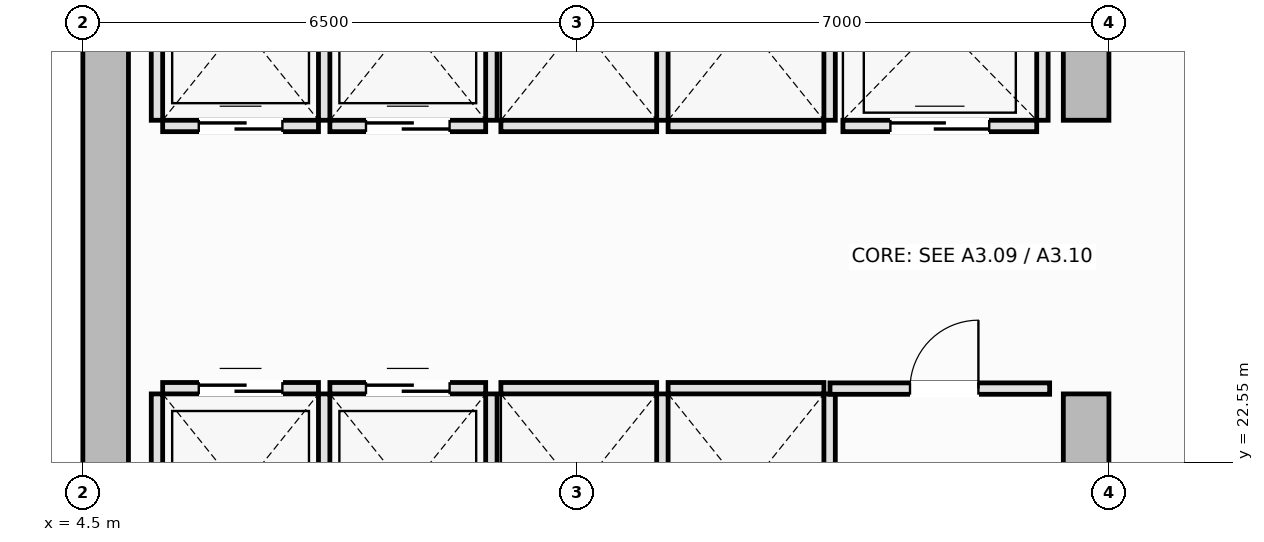
"""IFC4 building model, lengths in metres.
Left out: names, types, materials, properties, quantities, classifications, styles, units other than length and angle.
Written with IfcOpenShell. Run it as: python <this file> out.ifc"""

import sys

from ifc_helpers import new_model, si_unit, direction, frame, frame_2d, origin, place, context, subcontext, project, spatial, rectangle, extrude, element, fill, save


model = new_model("IFC4")
c1 = context("Model", 3, precision=1e-05, world=origin(), true_north=direction((0.0, 1.0)))
c2 = subcontext(c1, "Body", "Model", "MODEL_VIEW")
j1 = project(units=[si_unit("LENGTHUNIT", "METRE"), si_unit("PLANEANGLEUNIT", "RADIAN")], contexts=[c1])
p1 = place(None, origin())
s1 = spatial("IfcSite", under=j1, at=p1, CompositionType="ELEMENT")
p2 = place(p1, origin())
s2 = spatial("IfcBuilding", under=s1, at=p2, CompositionType="ELEMENT")
p3 = place(p2, frame((0.0, 0.0, 105.8)))
s3 = spatial("IfcBuildingStorey", under=s2, at=p3, CompositionType="ELEMENT", Elevation=105.8)
p4 = place(p3, frame((4.8, 14.6, 0.0), z_axis=(0.0, 0.0, 1.0), x_axis=(0.0, 1.0, 0.0)))
e1 = element("IfcWall", 1, at=p4, inside=s3, PredefinedType="SHEAR", context=c2, shape_type="SweptSolid", body=[
    extrude(rectangle(XDim=21.3, YDim=0.6, at=frame_2d((10.65, 0.0))), origin(), (0.0, 0.0, 1.0), 3.55),
])
p5 = place(p3, frame((17.7, 14.6, 0.0), z_axis=(0.0, 0.0, 1.0), x_axis=(0.0, 1.0, 0.0)))
e2 = element("IfcWall", 2, at=p5, inside=s3, PredefinedType="SHEAR", context=c2, shape_type="SweptSolid", body=[
    extrude(rectangle(XDim=8.85, YDim=0.6, at=frame_2d((4.425, 0.0))), origin(), (0.0, 0.0, 1.0), 3.55),
])
p6 = place(p5, frame((4.3, 0.0, 0.0)))
e3 = element("IfcOpeningElement", 3, at=p6, cuts=e2, PredefinedType="OPENING", context=c2, shape_type="SweptSolid", body=[
    extrude(rectangle(XDim=1.1, YDim=2.15, at=frame_2d((0.55, 1.075))), frame((0.0, 0.31, 0.0), z_axis=(0.0, -1.0, 0.0), x_axis=(1.0, 0.0, 0.0)), (0.0, 0.0, 1.0), 0.62),
])
p7 = place(p3, frame((17.7, 27.05, 0.0), z_axis=(0.0, 0.0, 1.0), x_axis=(0.0, 1.0, 0.0)))
e4 = element("IfcWall", 4, at=p7, inside=s3, PredefinedType="SHEAR", context=c2, shape_type="SweptSolid", body=[
    extrude(rectangle(XDim=8.85, YDim=0.6, at=frame_2d((4.425, 0.0))), origin(), (0.0, 0.0, 1.0), 3.55),
])
p8 = place(p7, frame((3.45, 0.0, 0.0)))
e5 = element("IfcOpeningElement", 5, at=p8, cuts=e4, PredefinedType="OPENING", context=c2, shape_type="SweptSolid", body=[
    extrude(rectangle(XDim=1.1, YDim=2.15, at=frame_2d((0.55, 1.075))), frame((0.0, 0.31, 0.0), z_axis=(0.0, -1.0, 0.0), x_axis=(1.0, 0.0, 0.0)), (0.0, 0.0, 1.0), 0.62),
])
p9 = place(p3, frame((5.55, 23.525, 0.0), z_axis=(0.0, 0.0, 1.0), x_axis=(1.0, 0.0, 0.0)))
e6 = element("IfcWall", 6, at=p9, inside=s3, PredefinedType="PARTITIONING", context=c2, shape_type="SweptSolid", body=[
    extrude(rectangle(XDim=2.05, YDim=0.15, at=frame_2d((1.025, 0.0))), origin(), (0.0, 0.0, 1.0), 3.37),
])
p10 = place(p9, frame((0.475, 0.0, 0.0)))
e7 = element("IfcOpeningElement", 7, at=p10, cuts=e6, PredefinedType="OPENING", context=c2, shape_type="SweptSolid", body=[
    extrude(rectangle(XDim=1.1, YDim=2.2, at=frame_2d((0.55, 1.1))), frame((0.0, 0.085, 0.0), z_axis=(0.0, -1.0, 0.0), x_axis=(1.0, 0.0, 0.0)), (0.0, 0.0, 1.0), 0.17),
])
for number, where, z_axis, x_axis in (
    (8, (5.475, 20.9, 0.0), (0.0, 0.0, 1.0), (0.0, 1.0, 0.0)),
    (9, (7.675, 20.9, 0.0), (0.0, 0.0, 1.0), (0.0, 1.0, 0.0)),
):
    element("IfcWall", number, at=place(p3, frame(where, z_axis=z_axis, x_axis=x_axis)), inside=s3, PredefinedType="PARTITIONING", context=c2, shape_type="SweptSolid", body=[
        extrude(rectangle(XDim=2.55, YDim=0.15, at=frame_2d((1.275, 0.0))), origin(), (0.0, 0.0, 1.0), 3.37),
    ])
p11 = place(p3, frame((7.75, 23.525, 0.0), z_axis=(0.0, 0.0, 1.0), x_axis=(1.0, 0.0, 0.0)))
e10 = element("IfcWall", 10, at=p11, inside=s3, PredefinedType="PARTITIONING", context=c2, shape_type="SweptSolid", body=[
    extrude(rectangle(XDim=2.05, YDim=0.15, at=frame_2d((1.025, 0.0))), origin(), (0.0, 0.0, 1.0), 3.37),
])
p12 = place(p11, frame((0.475, 0.0, 0.0)))
e11 = element("IfcOpeningElement", 11, at=p12, cuts=e10, PredefinedType="OPENING", context=c2, shape_type="SweptSolid", body=[
    extrude(rectangle(XDim=1.1, YDim=2.2, at=frame_2d((0.55, 1.1))), frame((0.0, 0.085, 0.0), z_axis=(0.0, -1.0, 0.0), x_axis=(1.0, 0.0, 0.0)), (0.0, 0.0, 1.0), 0.17),
])
p13 = place(p3, frame((9.875, 20.9, 0.0), z_axis=(0.0, 0.0, 1.0), x_axis=(0.0, 1.0, 0.0)))
e12 = element("IfcWall", 12, at=p13, inside=s3, PredefinedType="PARTITIONING", context=c2, shape_type="SweptSolid", body=[
    extrude(rectangle(XDim=2.55, YDim=0.15, at=frame_2d((1.275, 0.0))), origin(), (0.0, 0.0, 1.0), 3.37),
])
p14 = place(p3, frame((5.55, 26.975, 0.0), z_axis=(0.0, 0.0, 1.0), x_axis=(1.0, 0.0, 0.0)))
e13 = element("IfcWall", 13, at=p14, inside=s3, PredefinedType="PARTITIONING", context=c2, shape_type="SweptSolid", body=[
    extrude(rectangle(XDim=2.05, YDim=0.15, at=frame_2d((1.025, 0.0))), origin(), (0.0, 0.0, 1.0), 3.37),
])
p15 = place(p14, frame((0.475, 0.0, 0.0)))
e14 = element("IfcOpeningElement", 14, at=p15, cuts=e13, PredefinedType="OPENING", context=c2, shape_type="SweptSolid", body=[
    extrude(rectangle(XDim=1.1, YDim=2.2, at=frame_2d((0.55, 1.1))), frame((0.0, 0.085, 0.0), z_axis=(0.0, -1.0, 0.0), x_axis=(1.0, 0.0, 0.0)), (0.0, 0.0, 1.0), 0.17),
])
for number, where, z_axis, x_axis in (
    (15, (5.475, 27.05, 0.0), (0.0, 0.0, 1.0), (0.0, 1.0, 0.0)),
    (16, (7.675, 27.05, 0.0), (0.0, 0.0, 1.0), (0.0, 1.0, 0.0)),
):
    element("IfcWall", number, at=place(p3, frame(where, z_axis=z_axis, x_axis=x_axis)), inside=s3, PredefinedType="PARTITIONING", context=c2, shape_type="SweptSolid", body=[
        extrude(rectangle(XDim=2.55, YDim=0.15, at=frame_2d((1.275, 0.0))), origin(), (0.0, 0.0, 1.0), 3.37),
    ])
p16 = place(p3, frame((7.75, 26.975, 0.0), z_axis=(0.0, 0.0, 1.0), x_axis=(1.0, 0.0, 0.0)))
e17 = element("IfcWall", 17, at=p16, inside=s3, PredefinedType="PARTITIONING", context=c2, shape_type="SweptSolid", body=[
    extrude(rectangle(XDim=2.05, YDim=0.15, at=frame_2d((1.025, 0.0))), origin(), (0.0, 0.0, 1.0), 3.37),
])
p17 = place(p16, frame((0.475, 0.0, 0.0)))
e18 = element("IfcOpeningElement", 18, at=p17, cuts=e17, PredefinedType="OPENING", context=c2, shape_type="SweptSolid", body=[
    extrude(rectangle(XDim=1.1, YDim=2.2, at=frame_2d((0.55, 1.1))), frame((0.0, 0.085, 0.0), z_axis=(0.0, -1.0, 0.0), x_axis=(1.0, 0.0, 0.0)), (0.0, 0.0, 1.0), 0.17),
])
p18 = place(p3, frame((9.875, 27.05, 0.0), z_axis=(0.0, 0.0, 1.0), x_axis=(0.0, 1.0, 0.0)))
e19 = element("IfcWall", 19, at=p18, inside=s3, PredefinedType="PARTITIONING", context=c2, shape_type="SweptSolid", body=[
    extrude(rectangle(XDim=2.55, YDim=0.15, at=frame_2d((1.275, 0.0))), origin(), (0.0, 0.0, 1.0), 3.37),
])
p19 = place(p3, frame((10.0, 23.525, 0.0), z_axis=(0.0, 0.0, 1.0), x_axis=(1.0, 0.0, 0.0)))
e20 = element("IfcWall", 20, at=p19, inside=s3, PredefinedType="PARTITIONING", context=c2, shape_type="SweptSolid", body=[
    extrude(rectangle(XDim=2.05, YDim=0.15, at=frame_2d((1.025, 0.0))), origin(), (0.0, 0.0, 1.0), 3.37),
])
p20 = place(p3, frame((12.125, 20.9, 0.0), z_axis=(0.0, 0.0, 1.0), x_axis=(0.0, 1.0, 0.0)))
e21 = element("IfcWall", 21, at=p20, inside=s3, PredefinedType="PARTITIONING", context=c2, shape_type="SweptSolid", body=[
    extrude(rectangle(XDim=2.55, YDim=0.15, at=frame_2d((1.275, 0.0))), origin(), (0.0, 0.0, 1.0), 3.37),
])
p21 = place(p3, frame((12.2, 23.525, 0.0), z_axis=(0.0, 0.0, 1.0), x_axis=(1.0, 0.0, 0.0)))
e22 = element("IfcWall", 22, at=p21, inside=s3, PredefinedType="PARTITIONING", context=c2, shape_type="SweptSolid", body=[
    extrude(rectangle(XDim=2.05, YDim=0.15, at=frame_2d((1.025, 0.0))), origin(), (0.0, 0.0, 1.0), 3.37),
])
p22 = place(p3, frame((14.325, 20.9, 0.0), z_axis=(0.0, 0.0, 1.0), x_axis=(0.0, 1.0, 0.0)))
e23 = element("IfcWall", 23, at=p22, inside=s3, PredefinedType="PARTITIONING", context=c2, shape_type="SweptSolid", body=[
    extrude(rectangle(XDim=2.55, YDim=0.15, at=frame_2d((1.275, 0.0))), origin(), (0.0, 0.0, 1.0), 3.37),
])
p23 = place(p3, frame((10.0, 26.975, 0.0), z_axis=(0.0, 0.0, 1.0), x_axis=(1.0, 0.0, 0.0)))
e24 = element("IfcWall", 24, at=p23, inside=s3, PredefinedType="PARTITIONING", context=c2, shape_type="SweptSolid", body=[
    extrude(rectangle(XDim=2.05, YDim=0.15, at=frame_2d((1.025, 0.0))), origin(), (0.0, 0.0, 1.0), 3.37),
])
p24 = place(p3, frame((12.125, 27.05, 0.0), z_axis=(0.0, 0.0, 1.0), x_axis=(0.0, 1.0, 0.0)))
e25 = element("IfcWall", 25, at=p24, inside=s3, PredefinedType="PARTITIONING", context=c2, shape_type="SweptSolid", body=[
    extrude(rectangle(XDim=2.55, YDim=0.15, at=frame_2d((1.275, 0.0))), origin(), (0.0, 0.0, 1.0), 3.37),
])
p25 = place(p3, frame((12.2, 26.975, 0.0), z_axis=(0.0, 0.0, 1.0), x_axis=(1.0, 0.0, 0.0)))
e26 = element("IfcWall", 26, at=p25, inside=s3, PredefinedType="PARTITIONING", context=c2, shape_type="SweptSolid", body=[
    extrude(rectangle(XDim=2.05, YDim=0.15, at=frame_2d((1.025, 0.0))), origin(), (0.0, 0.0, 1.0), 3.37),
])
p26 = place(p3, frame((14.325, 27.05, 0.0), z_axis=(0.0, 0.0, 1.0), x_axis=(0.0, 1.0, 0.0)))
e27 = element("IfcWall", 27, at=p26, inside=s3, PredefinedType="PARTITIONING", context=c2, shape_type="SweptSolid", body=[
    extrude(rectangle(XDim=2.55, YDim=0.15, at=frame_2d((1.275, 0.0))), origin(), (0.0, 0.0, 1.0), 3.37),
])
p27 = place(p3, frame((14.5, 26.975, 0.0), z_axis=(0.0, 0.0, 1.0), x_axis=(1.0, 0.0, 0.0)))
e28 = element("IfcWall", 28, at=p27, inside=s3, PredefinedType="PARTITIONING", context=c2, shape_type="SweptSolid", body=[
    extrude(rectangle(XDim=2.55, YDim=0.15, at=frame_2d((1.275, 0.0))), origin(), (0.0, 0.0, 1.0), 3.37),
])
p28 = place(p27, frame((0.625, 0.0, 0.0)))
e29 = element("IfcOpeningElement", 29, at=p28, cuts=e28, PredefinedType="OPENING", context=c2, shape_type="SweptSolid", body=[
    extrude(rectangle(XDim=1.3, YDim=2.2, at=frame_2d((0.65, 1.1))), frame((0.0, 0.085, 0.0), z_axis=(0.0, -1.0, 0.0), x_axis=(1.0, 0.0, 0.0)), (0.0, 0.0, 1.0), 0.17),
])
p29 = place(p3, frame((17.125, 27.05, 0.0), z_axis=(0.0, 0.0, 1.0), x_axis=(0.0, 1.0, 0.0)))
e30 = element("IfcWall", 30, at=p29, inside=s3, PredefinedType="PARTITIONING", context=c2, shape_type="SweptSolid", body=[
    extrude(rectangle(XDim=2.6, YDim=0.15, at=frame_2d((1.3, 0.0))), origin(), (0.0, 0.0, 1.0), 3.37),
])
p30 = place(p3, frame((14.33, 23.52, 0.0), z_axis=(0.0, 0.0, 1.0), x_axis=(1.0, 0.0, 0.0)))
e31 = element("IfcWall", 31, at=p30, inside=s3, PredefinedType="PARTITIONING", context=c2, shape_type="SweptSolid", body=[
    extrude(rectangle(XDim=2.89, YDim=0.15, at=frame_2d((1.445, 0.0))), origin(), (0.0, 0.0, 1.0), 3.37),
])
p31 = place(p30, frame((1.053, 0.0, 0.0)))
e32 = element("IfcOpeningElement", 32, at=p31, cuts=e31, PredefinedType="OPENING", context=c2, shape_type="SweptSolid", body=[
    extrude(rectangle(XDim=0.9, YDim=2.1, at=frame_2d((0.45, 1.05))), frame((0.0, 0.085, 0.0), z_axis=(0.0, -1.0, 0.0), x_axis=(1.0, 0.0, 0.0)), (0.0, 0.0, 1.0), 0.17),
])
p32 = place(p10, origin())
e33 = element("IfcDoor", 33, at=p32, inside=s3, OperationType="DOUBLE_DOOR_SLIDING", PredefinedType="DOOR", context=c2, shape_type="SweptSolid", body=[
    extrude(rectangle(XDim=1.1, YDim=2.2, at=frame_2d((0.55, 1.1))), frame((0.0, 0.025, 0.0), z_axis=(0.0, -1.0, 0.0), x_axis=(1.0, 0.0, 0.0)), (0.0, 0.0, 1.0), 0.05),
])
fill(e7, e33)
p33 = place(p12, origin())
e34 = element("IfcDoor", 34, at=p33, inside=s3, OperationType="DOUBLE_DOOR_SLIDING", PredefinedType="DOOR", context=c2, shape_type="SweptSolid", body=[
    extrude(rectangle(XDim=1.1, YDim=2.2, at=frame_2d((0.55, 1.1))), frame((0.0, 0.025, 0.0), z_axis=(0.0, -1.0, 0.0), x_axis=(1.0, 0.0, 0.0)), (0.0, 0.0, 1.0), 0.05),
])
fill(e11, e34)
p34 = place(p15, origin())
e35 = element("IfcDoor", 35, at=p34, inside=s3, OperationType="DOUBLE_DOOR_SLIDING", PredefinedType="DOOR", context=c2, shape_type="SweptSolid", body=[
    extrude(rectangle(XDim=1.1, YDim=2.2, at=frame_2d((0.55, 1.1))), frame((0.0, 0.025, 0.0), z_axis=(0.0, -1.0, 0.0), x_axis=(1.0, 0.0, 0.0)), (0.0, 0.0, 1.0), 0.05),
])
fill(e14, e35)
p35 = place(p17, origin())
e36 = element("IfcDoor", 36, at=p35, inside=s3, OperationType="DOUBLE_DOOR_SLIDING", PredefinedType="DOOR", context=c2, shape_type="SweptSolid", body=[
    extrude(rectangle(XDim=1.1, YDim=2.2, at=frame_2d((0.55, 1.1))), frame((0.0, 0.025, 0.0), z_axis=(0.0, -1.0, 0.0), x_axis=(1.0, 0.0, 0.0)), (0.0, 0.0, 1.0), 0.05),
])
fill(e18, e36)
p36 = place(p28, origin())
e37 = element("IfcDoor", 37, at=p36, inside=s3, OperationType="DOUBLE_DOOR_SLIDING", PredefinedType="DOOR", context=c2, shape_type="SweptSolid", body=[
    extrude(rectangle(XDim=1.3, YDim=2.2, at=frame_2d((0.65, 1.1))), frame((0.0, 0.025, 0.0), z_axis=(0.0, -1.0, 0.0), x_axis=(1.0, 0.0, 0.0)), (0.0, 0.0, 1.0), 0.05),
])
fill(e29, e37)
p37 = place(p31, origin())
e38 = element("IfcDoor", 38, at=p37, inside=s3, OperationType="SINGLE_SWING_RIGHT", PredefinedType="DOOR", context=c2, shape_type="SweptSolid", body=[
    extrude(rectangle(XDim=0.9, YDim=2.1, at=frame_2d((0.45, 1.05))), frame((0.0, 0.025, 0.0), z_axis=(0.0, -1.0, 0.0), x_axis=(1.0, 0.0, 0.0)), (0.0, 0.0, 1.0), 0.05),
])
fill(e32, e38)
save(model, sys.argv[1])
